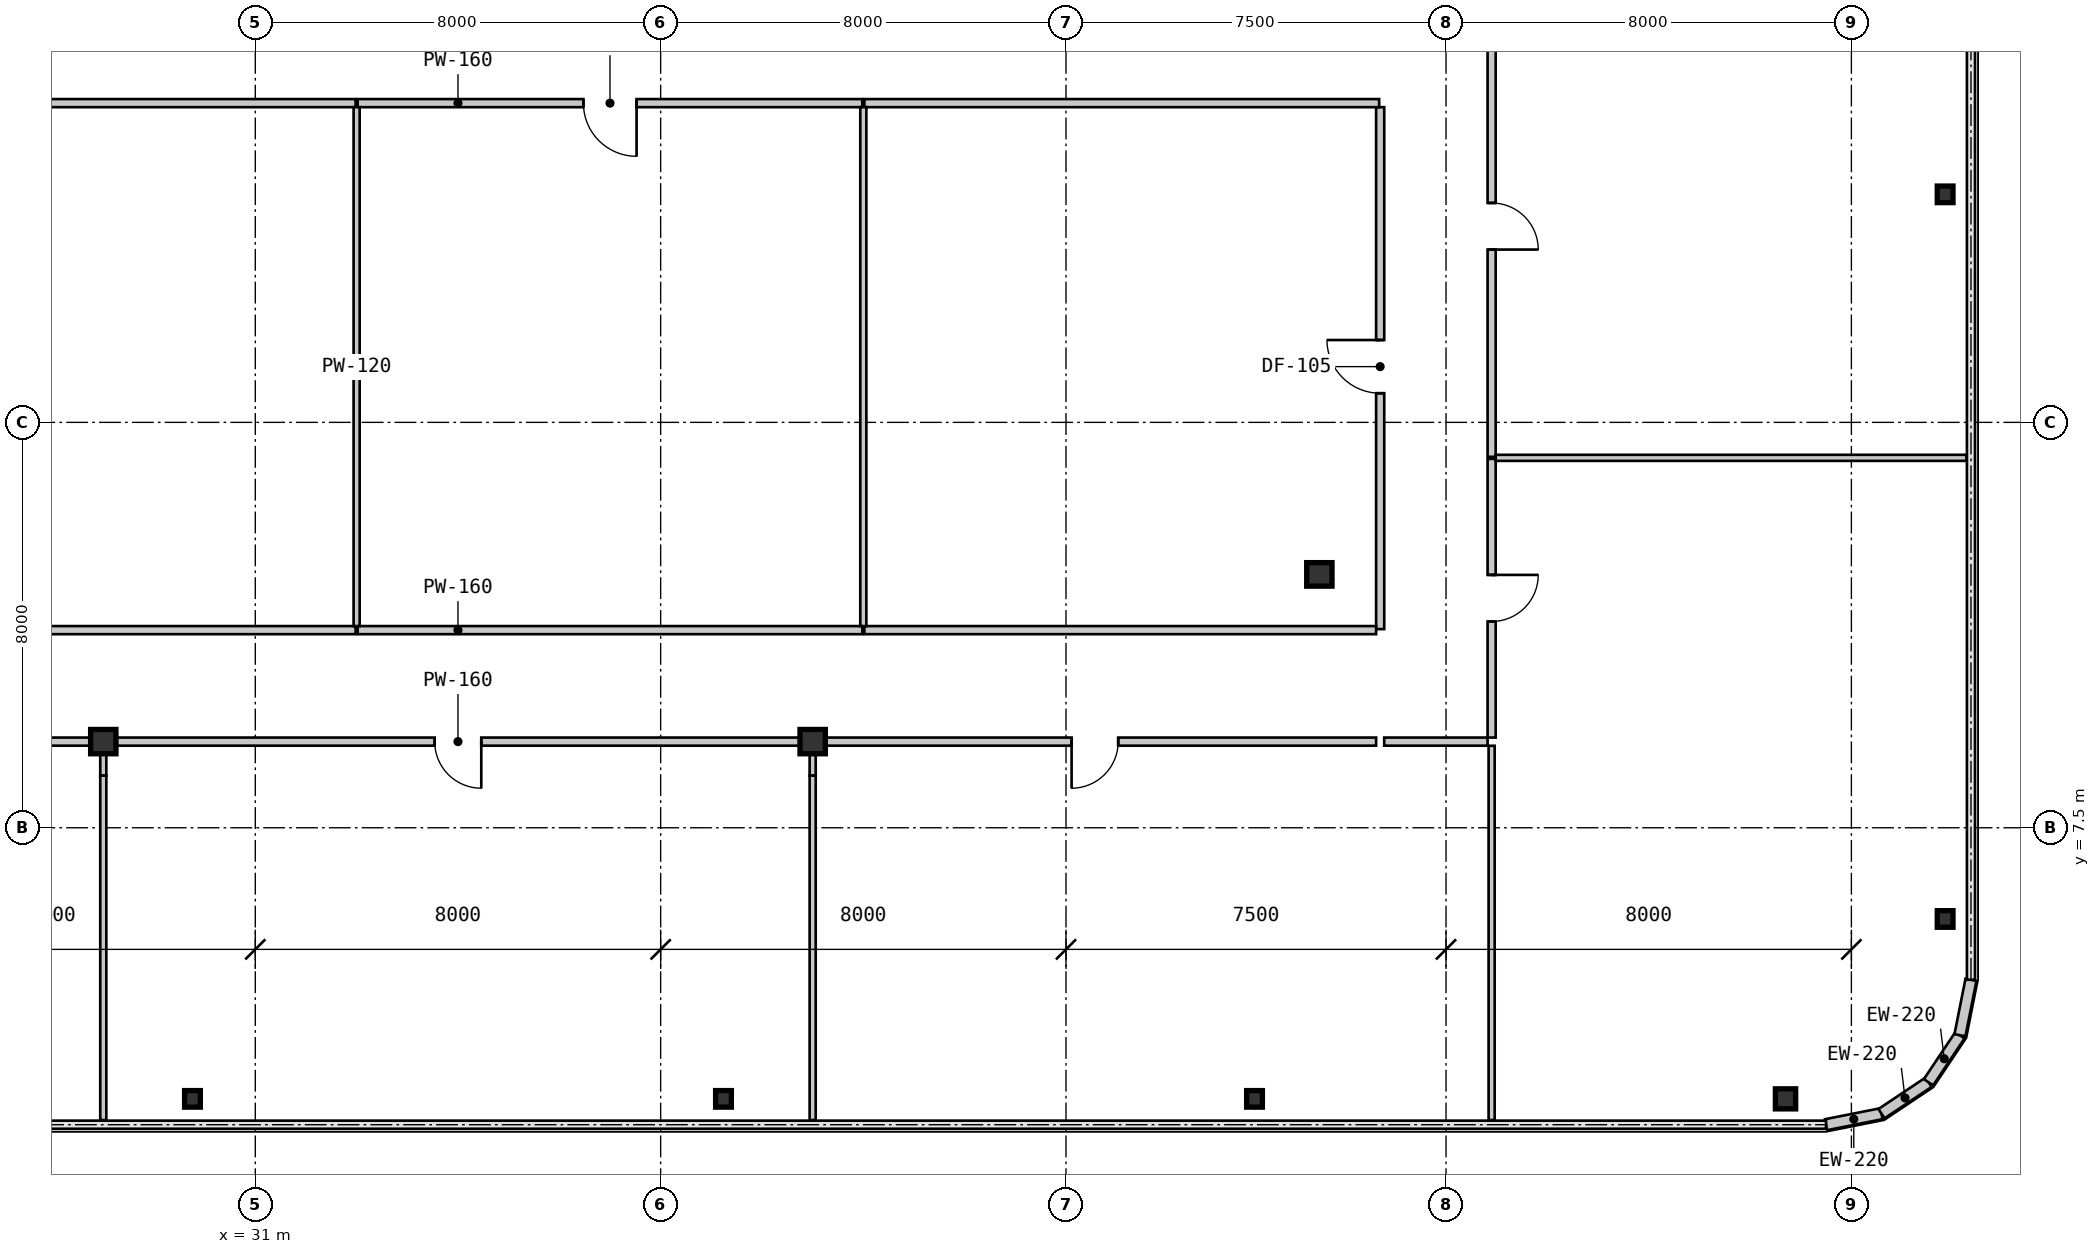
"""IFC4 building model, lengths in metres.
Left out: names, types, materials, properties, quantities, classifications, styles, units other than length and angle.
Written with IfcOpenShell. Run it as: python <this file> out.ifc"""

import sys

from ifc_helpers import new_model, si_unit, direction, frame, frame_2d, origin, origin_2d, place, context, subcontext, project, spatial, rectangle, i_section, extrude, source, transform, mapped, element, fill, save


model = new_model("IFC4")
c1 = context("Model", 3, precision=1e-05, world=origin(), true_north=direction((0.0, 1.0)))
c2 = subcontext(c1, "Body", "Model", "MODEL_VIEW")
j1 = project(units=[si_unit("LENGTHUNIT", "METRE"), si_unit("PLANEANGLEUNIT", "RADIAN")], contexts=[c1])
p1 = place(None, origin())
s1 = spatial("IfcSite", under=j1, at=p1, CompositionType="ELEMENT")
p2 = place(p1, origin())
s2 = spatial("IfcBuilding", under=s1, at=p2, CompositionType="ELEMENT")
p3 = place(p2, frame((0.0, 0.0, 38.85)))
s3 = spatial("IfcBuildingStorey", under=s2, at=p3, CompositionType="ELEMENT", Elevation=38.85)
m1 = source(origin(), c2, "Body", "SweptSolid", [
    extrude(i_section(OverallWidth=0.5, OverallDepth=0.48, WebThickness=0.028, FlangeThickness=0.044, at=origin_2d()), origin(), (0.0, 0.0, 1.0), 3.15),
])
for number, where, z_axis, x_axis in (
    (1, (28.0, 9.2, 0.0), (0.0, 0.0, 1.0), (1.0, 0.0, 0.0)),
    (2, (42.0, 9.2, 0.0), (0.0, 0.0, 1.0), (1.0, 0.0, 0.0)),
):
    element("IfcColumn", number, at=place(p3, frame(where, z_axis=z_axis, x_axis=x_axis)), inside=s3, PredefinedType="COLUMN", context=c2, shape_type="MappedRepresentation", body=[
        mapped(m1, transform((0.0, 0.0, 0.0), scale=1.0)),
    ])
m2 = source(origin(), c2, "Body", "SweptSolid", [
    extrude(i_section(OverallWidth=0.5, OverallDepth=0.464, WebThickness=0.022, FlangeThickness=0.034, at=origin_2d()), origin(), (0.0, 0.0, 1.0), 3.15),
])
p4 = place(p3, frame((52.0, 12.5, 0.0), z_axis=(0.0, 0.0, 1.0), x_axis=(1.0, 0.0, 0.0)))
e3 = element("IfcColumn", 3, at=p4, inside=s3, PredefinedType="COLUMN", context=c2, shape_type="MappedRepresentation", body=[
    mapped(m2, transform((0.0, 0.0, 0.0), scale=1.0)),
])
m3 = source(origin(), c2, "Body", "SweptSolid", [
    extrude(i_section(OverallWidth=0.311, OverallDepth=0.327, WebThickness=0.016, FlangeThickness=0.025, at=origin_2d()), origin(), (0.0, 0.0, 1.0), 3.15),
])
for number, where, z_axis, x_axis in (
    (4, (29.76, 2.15, 0.0), (0.0, 0.0, 1.0), (1.0, 0.0, 0.0)),
    (5, (40.24, 2.15, 0.0), (0.0, 0.0, 1.0), (1.0, 0.0, 0.0)),
    (6, (50.72, 2.15, 0.0), (0.0, 0.0, 1.0), (1.0, 0.0, 0.0)),
):
    element("IfcColumn", number, at=place(p3, frame(where, z_axis=z_axis, x_axis=x_axis)), inside=s3, PredefinedType="COLUMN", context=c2, shape_type="MappedRepresentation", body=[
        mapped(m3, transform((0.0, 0.0, 0.0), scale=1.0)),
    ])
m4 = source(origin(), c2, "Body", "SweptSolid", [
    extrude(i_section(OverallWidth=0.4, OverallDepth=0.396, WebThickness=0.022, FlangeThickness=0.034, at=origin_2d()), origin(), (0.0, 0.0, 1.0), 3.15),
])
p5 = place(p3, frame((61.2, 2.15, 0.0), z_axis=(0.0, 0.0, 1.0), x_axis=(1.0, 0.0, 0.0)))
e7 = element("IfcColumn", 7, at=p5, inside=s3, PredefinedType="COLUMN", context=c2, shape_type="MappedRepresentation", body=[
    mapped(m4, transform((0.0, 0.0, 0.0), scale=1.0)),
])
for number, where, z_axis, x_axis in (
    (8, (64.35, 5.7, 0.0), (0.0, 0.0, 1.0), (1.0, 0.0, 0.0)),
    (9, (64.35, 20.0, 0.0), (0.0, 0.0, 1.0), (1.0, 0.0, 0.0)),
):
    element("IfcColumn", number, at=place(p3, frame(where, z_axis=z_axis, x_axis=x_axis)), inside=s3, PredefinedType="COLUMN", context=c2, shape_type="MappedRepresentation", body=[
        mapped(m3, transform((0.0, 0.0, 0.0), scale=1.0)),
    ])
m5 = source(origin(), c2, "Body", "SweptSolid", [
    extrude(rectangle(XDim=1.116, YDim=0.22, at=frame_2d((0.558, 0.0))), origin(), (0.0, 0.0, 1.0), 2.93),
])
for number, where, z_axis, x_axis in (
    (10, (62.0, 1.64, 0.0), (0.0, 0.0, 1.0), (0.981, 0.195, 0.0)),
    (11, (63.094, 1.858, 0.0), (0.0, 0.0, 1.0), (0.831, 0.556, 0.0)),
    (12, (64.022, 2.478, 0.0), (0.0, 0.0, 1.0), (0.556, 0.831, 0.0)),
    (13, (64.642, 3.406, 0.0), (0.0, 0.0, 1.0), (0.195, 0.981, 0.0)),
):
    element("IfcWall", number, at=place(p3, frame(where, z_axis=z_axis, x_axis=x_axis)), inside=s3, PredefinedType="SOLIDWALL", context=c2, shape_type="MappedRepresentation", body=[
        mapped(m5, transform((0.0, 0.0, 0.0), scale=1.0)),
    ])
m6 = source(origin(), c2, "Body", "SweptSolid", [
    extrude(rectangle(XDim=16.159, YDim=0.16, at=frame_2d((8.08, 0.0))), origin(), (0.0, 0.0, 1.0), 2.93),
])
p6 = place(p3, frame((32.98, 21.8, 0.0), z_axis=(0.0, 0.0, 1.0), x_axis=(-1.0, 0.0, 0.0)))
e14 = element("IfcWall", 14, at=p6, inside=s3, PredefinedType="PARTITIONING", context=c2, shape_type="MappedRepresentation", body=[
    mapped(m6, transform((0.0, 0.0, 0.0), scale=1.0)),
])
m7 = source(origin(), c2, "Body", "SweptSolid", [
    extrude(rectangle(XDim=0.92, YDim=2.1, at=frame_2d((0.46, 1.05))), frame((0.0, 0.09, 0.0), z_axis=(0.0, -1.0, 0.0), x_axis=(1.0, 0.0, 0.0)), (0.0, 0.0, 1.0), 0.18),
])
p7 = place(p6, frame((7.62, 0.0, 0.0)))
e15 = element("IfcOpeningElement", 15, at=p7, cuts=e14, PredefinedType="OPENING", context=c2, shape_type="MappedRepresentation", body=[
    mapped(m7, transform((0.0, 0.0, 0.0), scale=1.0)),
])
m8 = source(origin(), c2, "Body", "SweptSolid", [
    extrude(rectangle(XDim=9.959, YDim=0.16, at=frame_2d((4.98, 0.0))), origin(), (0.0, 0.0, 1.0), 2.93),
])
p8 = place(p3, frame((42.98, 21.8, 0.0), z_axis=(0.0, 0.0, 1.0), x_axis=(-1.0, 0.0, 0.0)))
e16 = element("IfcWall", 16, at=p8, inside=s3, PredefinedType="PARTITIONING", context=c2, shape_type="MappedRepresentation", body=[
    mapped(m8, transform((0.0, 0.0, 0.0), scale=1.0)),
])
m9 = source(origin(), c2, "Body", "SweptSolid", [
    extrude(rectangle(XDim=1.05, YDim=2.1, at=frame_2d((0.525, 1.05))), frame((0.0, 0.09, 0.0), z_axis=(0.0, -1.0, 0.0), x_axis=(1.0, 0.0, 0.0)), (0.0, 0.0, 1.0), 0.18),
])
p9 = place(p8, frame((4.455, 0.0, 0.0)))
e17 = element("IfcOpeningElement", 17, at=p9, cuts=e16, PredefinedType="OPENING", context=c2, shape_type="MappedRepresentation", body=[
    mapped(m9, transform((0.0, 0.0, 0.0), scale=1.0)),
])
m10 = source(origin(), c2, "Body", "SweptSolid", [
    extrude(rectangle(XDim=10.3, YDim=0.16, at=frame_2d((5.15, 0.0))), origin(), (0.0, 0.0, 1.0), 2.93),
])
p10 = place(p3, frame((53.2, 11.42, 0.0), z_axis=(0.0, 0.0, 1.0), x_axis=(0.0, 1.0, 0.0)))
e18 = element("IfcWall", 18, at=p10, inside=s3, PredefinedType="PARTITIONING", context=c2, shape_type="MappedRepresentation", body=[
    mapped(m10, transform((0.0, 0.0, 0.0), scale=1.0)),
])
p11 = place(p10, frame((4.655, 0.0, 0.0)))
e19 = element("IfcOpeningElement", 19, at=p11, cuts=e18, PredefinedType="OPENING", context=c2, shape_type="MappedRepresentation", body=[
    mapped(m9, transform((0.0, 0.0, 0.0), scale=1.0)),
])
m11 = source(origin(), c2, "Body", "SweptSolid", [
    extrude(rectangle(XDim=10.159, YDim=0.16, at=frame_2d((5.08, 0.0))), origin(), (0.0, 0.0, 1.0), 2.93),
])
p12 = place(p3, frame((53.18, 21.8, 0.0), z_axis=(0.0, 0.0, 1.0), x_axis=(-1.0, 0.0, 0.0)))
e20 = element("IfcWall", 20, at=p12, inside=s3, PredefinedType="PARTITIONING", context=c2, shape_type="MappedRepresentation", body=[
    mapped(m11, transform((0.0, 0.0, 0.0), scale=1.0)),
])
m12 = source(origin(), c2, "Body", "SweptSolid", [
    extrude(rectangle(XDim=2.04, YDim=0.16, at=frame_2d((1.02, 0.0))), origin(), (0.0, 0.0, 1.0), 2.93),
])
p13 = place(p3, frame((55.32, 9.2, 0.0), z_axis=(0.0, 0.0, 1.0), x_axis=(-1.0, 0.0, 0.0)))
e21 = element("IfcWall", 21, at=p13, inside=s3, PredefinedType="PARTITIONING", context=c2, shape_type="MappedRepresentation", body=[
    mapped(m12, transform((0.0, 0.0, 0.0), scale=1.0)),
])
m13 = source(origin(), c2, "Body", "SweptSolid", [
    extrude(rectangle(XDim=5.5, YDim=0.16, at=frame_2d((2.75, 0.0))), origin(), (0.0, 0.0, 1.0), 2.93),
])
p14 = place(p3, frame((55.4, 14.78, 0.0), z_axis=(0.0, 0.0, 1.0), x_axis=(0.0, -1.0, 0.0)))
e22 = element("IfcWall", 22, at=p14, inside=s3, PredefinedType="PARTITIONING", context=c2, shape_type="MappedRepresentation", body=[
    mapped(m13, transform((0.0, 0.0, 0.0), scale=1.0)),
])
p15 = place(p14, frame((2.29, 0.0, 0.0)))
e23 = element("IfcOpeningElement", 23, at=p15, cuts=e22, PredefinedType="OPENING", context=c2, shape_type="MappedRepresentation", body=[
    mapped(m7, transform((0.0, 0.0, 0.0), scale=1.0)),
])
m14 = source(origin(), c2, "Body", "SweptSolid", [
    extrude(rectangle(XDim=9.1, YDim=0.16, at=frame_2d((4.55, 0.0))), origin(), (0.0, 0.0, 1.0), 2.93),
])
p16 = place(p3, frame((55.4, 23.92, 0.0), z_axis=(0.0, 0.0, 1.0), x_axis=(0.0, -1.0, 0.0)))
e24 = element("IfcWall", 24, at=p16, inside=s3, PredefinedType="PARTITIONING", context=c2, shape_type="MappedRepresentation", body=[
    mapped(m14, transform((0.0, 0.0, 0.0), scale=1.0)),
])
p17 = place(p16, frame((4.09, 0.0, 0.0)))
e25 = element("IfcOpeningElement", 25, at=p17, cuts=e24, PredefinedType="OPENING", context=c2, shape_type="MappedRepresentation", body=[
    mapped(m7, transform((0.0, 0.0, 0.0), scale=1.0)),
])
m15 = source(origin(), c2, "Body", "SweptSolid", [
    extrude(rectangle(XDim=16.1, YDim=0.16, at=frame_2d((8.05, 0.0))), origin(), (0.0, 0.0, 1.0), 2.93),
])
p18 = place(p3, frame((16.88, 11.4, 0.0), z_axis=(0.0, 0.0, 1.0), x_axis=(1.0, 0.0, 0.0)))
e26 = element("IfcWall", 26, at=p18, inside=s3, PredefinedType="PARTITIONING", context=c2, shape_type="MappedRepresentation", body=[
    mapped(m15, transform((0.0, 0.0, 0.0), scale=1.0)),
])
p19 = place(p3, frame((33.02, 11.4, 0.0), z_axis=(0.0, 0.0, 1.0), x_axis=(1.0, 0.0, 0.0)))
e27 = element("IfcWall", 27, at=p19, inside=s3, PredefinedType="PARTITIONING", context=c2, shape_type="MappedRepresentation", body=[
    mapped(m8, transform((0.0, 0.0, 0.0), scale=1.0)),
])
m16 = source(origin(), c2, "Body", "SweptSolid", [
    extrude(rectangle(XDim=10.1, YDim=0.16, at=frame_2d((5.05, 0.0))), origin(), (0.0, 0.0, 1.0), 2.93),
])
p20 = place(p3, frame((43.02, 11.4, 0.0), z_axis=(0.0, 0.0, 1.0), x_axis=(1.0, 0.0, 0.0)))
e28 = element("IfcWall", 28, at=p20, inside=s3, PredefinedType="PARTITIONING", context=c2, shape_type="MappedRepresentation", body=[
    mapped(m16, transform((0.0, 0.0, 0.0), scale=1.0)),
])
m17 = source(origin(), c2, "Body", "SweptSolid", [
    extrude(rectangle(XDim=11.1, YDim=0.16, at=frame_2d((5.55, 0.0))), origin(), (0.0, 0.0, 1.0), 2.93),
])
p21 = place(p3, frame((27.98, 9.2, 0.0), z_axis=(0.0, 0.0, 1.0), x_axis=(-1.0, 0.0, 0.0)))
e29 = element("IfcWall", 29, at=p21, inside=s3, PredefinedType="PARTITIONING", context=c2, shape_type="MappedRepresentation", body=[
    mapped(m17, transform((0.0, 0.0, 0.0), scale=1.0)),
])
p22 = place(p21, frame((5.09, 0.0, 0.0)))
e30 = element("IfcOpeningElement", 30, at=p22, cuts=e29, PredefinedType="OPENING", context=c2, shape_type="MappedRepresentation", body=[
    mapped(m7, transform((0.0, 0.0, 0.0), scale=1.0)),
])
m18 = source(origin(), c2, "Body", "SweptSolid", [
    extrude(rectangle(XDim=13.959, YDim=0.16, at=frame_2d((6.98, 0.0))), origin(), (0.0, 0.0, 1.0), 2.328),
])
p23 = place(p3, frame((41.98, 9.2, 0.0), z_axis=(0.0, 0.0, 1.0), x_axis=(-1.0, 0.0, 0.0)))
e31 = element("IfcWall", 31, at=p23, inside=s3, PredefinedType="PARTITIONING", context=c2, shape_type="MappedRepresentation", body=[
    mapped(m18, transform((0.0, 0.0, 0.0), scale=1.0)),
])
p24 = place(p23, frame((6.52, 0.0, 0.0)))
e32 = element("IfcOpeningElement", 32, at=p24, cuts=e31, PredefinedType="OPENING", context=c2, shape_type="MappedRepresentation", body=[
    mapped(m7, transform((0.0, 0.0, 0.0), scale=1.0)),
])
p25 = place(p3, frame((53.12, 9.2, 0.0), z_axis=(0.0, 0.0, 1.0), x_axis=(-1.0, 0.0, 0.0)))
e33 = element("IfcWall", 33, at=p25, inside=s3, PredefinedType="PARTITIONING", context=c2, shape_type="MappedRepresentation", body=[
    mapped(m17, transform((0.0, 0.0, 0.0), scale=1.0)),
])
p26 = place(p25, frame((5.09, 0.0, 0.0)))
e34 = element("IfcOpeningElement", 34, at=p26, cuts=e33, PredefinedType="OPENING", context=c2, shape_type="MappedRepresentation", body=[
    mapped(m7, transform((0.0, 0.0, 0.0), scale=1.0)),
])
m19 = source(origin(), c2, "Body", "SweptSolid", [
    extrude(rectangle(XDim=10.24, YDim=0.12, at=frame_2d((5.12, 0.0))), origin(), (0.0, 0.0, 1.0), 2.93),
])
for number, where, z_axis, x_axis in (
    (35, (33.0, 21.72, 0.0), (0.0, 0.0, 1.0), (0.0, -1.0, 0.0)),
    (36, (43.0, 21.72, 0.0), (0.0, 0.0, 1.0), (0.0, -1.0, 0.0)),
):
    element("IfcWall", number, at=place(p3, frame(where, z_axis=z_axis, x_axis=x_axis)), inside=s3, PredefinedType="PARTITIONING", context=c2, shape_type="MappedRepresentation", body=[
        mapped(m19, transform((0.0, 0.0, 0.0), scale=1.0)),
    ])
m20 = source(origin(), c2, "Body", "SweptSolid", [
    extrude(rectangle(XDim=0.59, YDim=0.12, at=frame_2d((0.295, 0.0))), origin(), (0.0, 0.0, 1.0), 2.397),
])
p27 = place(p3, frame((28.0, 9.118, 0.0), z_axis=(0.0, 0.0, 1.0), x_axis=(0.0, -1.0, 0.0)))
e37 = element("IfcWall", 37, at=p27, inside=s3, PredefinedType="PARTITIONING", context=c2, shape_type="MappedRepresentation", body=[
    mapped(m20, transform((0.0, 0.0, 0.0), scale=1.0)),
])
m21 = source(origin(), c2, "Body", "SweptSolid", [
    extrude(rectangle(XDim=6.796, YDim=0.12, at=frame_2d((3.398, 0.0))), origin(), (0.0, 0.0, 1.0), 2.93),
])
p28 = place(p3, frame((28.0, 8.528, 0.0), z_axis=(0.0, 0.0, 1.0), x_axis=(0.0, -1.0, 0.0)))
e38 = element("IfcWall", 38, at=p28, inside=s3, PredefinedType="PARTITIONING", context=c2, shape_type="MappedRepresentation", body=[
    mapped(m21, transform((0.0, 0.0, 0.0), scale=1.0)),
])
p29 = place(p3, frame((42.0, 9.118, 0.0), z_axis=(0.0, 0.0, 1.0), x_axis=(0.0, -1.0, 0.0)))
e39 = element("IfcWall", 39, at=p29, inside=s3, PredefinedType="PARTITIONING", context=c2, shape_type="MappedRepresentation", body=[
    mapped(m20, transform((0.0, 0.0, 0.0), scale=1.0)),
])
p30 = place(p3, frame((42.0, 8.528, 0.0), z_axis=(0.0, 0.0, 1.0), x_axis=(0.0, -1.0, 0.0)))
e40 = element("IfcWall", 40, at=p30, inside=s3, PredefinedType="PARTITIONING", context=c2, shape_type="MappedRepresentation", body=[
    mapped(m21, transform((0.0, 0.0, 0.0), scale=1.0)),
])
m22 = source(origin(), c2, "Body", "SweptSolid", [
    extrude(rectangle(XDim=7.386, YDim=0.12, at=frame_2d((3.693, 0.0))), origin(), (0.0, 0.0, 1.0), 2.93),
])
p31 = place(p3, frame((55.4, 9.118, 0.0), z_axis=(0.0, 0.0, 1.0), x_axis=(0.0, -1.0, 0.0)))
e41 = element("IfcWall", 41, at=p31, inside=s3, PredefinedType="PARTITIONING", context=c2, shape_type="MappedRepresentation", body=[
    mapped(m22, transform((0.0, 0.0, 0.0), scale=1.0)),
])
m23 = source(origin(), c2, "Body", "SweptSolid", [
    extrude(rectangle(XDim=9.29, YDim=0.12, at=frame_2d((4.645, 0.0))), origin(), (0.0, 0.0, 1.0), 2.93),
])
p32 = place(p3, frame((55.48, 14.8, 0.0), z_axis=(0.0, 0.0, 1.0), x_axis=(1.0, 0.0, 0.0)))
e42 = element("IfcWall", 42, at=p32, inside=s3, PredefinedType="PARTITIONING", context=c2, shape_type="MappedRepresentation", body=[
    mapped(m23, transform((0.0, 0.0, 0.0), scale=1.0)),
])
m24 = source(origin(), c2, "Body", "SweptSolid", [
    extrude(rectangle(XDim=1.05, YDim=2.1, at=frame_2d((0.525, 1.05))), frame((0.0, 0.025, 0.0), z_axis=(0.0, -1.0, 0.0), x_axis=(1.0, 0.0, 0.0)), (0.0, 0.0, 1.0), 0.05),
])
p33 = place(p9, origin())
e43 = element("IfcDoor", 43, at=p33, inside=s3, OperationType="SINGLE_SWING_LEFT", PredefinedType="DOOR", context=c2, shape_type="MappedRepresentation", body=[
    mapped(m24, transform((0.0, 0.0, 0.0), scale=1.0)),
])
fill(e17, e43)
p34 = place(p11, origin())
e44 = element("IfcDoor", 44, at=p34, inside=s3, OperationType="SINGLE_SWING_RIGHT", PredefinedType="DOOR", context=c2, shape_type="MappedRepresentation", body=[
    mapped(m24, transform((0.0, 0.0, 0.0), scale=1.0)),
])
fill(e19, e44)
m25 = source(origin(), c2, "Body", "SweptSolid", [
    extrude(rectangle(XDim=0.92, YDim=2.1, at=frame_2d((0.46, 1.05))), frame((0.0, 0.025, 0.0), z_axis=(0.0, -1.0, 0.0), x_axis=(1.0, 0.0, 0.0)), (0.0, 0.0, 1.0), 0.05),
])
p35 = place(p15, origin())
e45 = element("IfcDoor", 45, at=p35, inside=s3, OperationType="SINGLE_SWING_LEFT", PredefinedType="DOOR", context=c2, shape_type="MappedRepresentation", body=[
    mapped(m25, transform((0.0, 0.0, 0.0), scale=1.0)),
])
fill(e23, e45)
p36 = place(p17, origin())
e46 = element("IfcDoor", 46, at=p36, inside=s3, OperationType="SINGLE_SWING_RIGHT", PredefinedType="DOOR", context=c2, shape_type="MappedRepresentation", body=[
    mapped(m25, transform((0.0, 0.0, 0.0), scale=1.0)),
])
fill(e25, e46)
p37 = place(p24, origin())
e47 = element("IfcDoor", 47, at=p37, inside=s3, OperationType="SINGLE_SWING_LEFT", PredefinedType="DOOR", context=c2, shape_type="MappedRepresentation", body=[
    mapped(m25, transform((0.0, 0.0, 0.0), scale=1.0)),
])
fill(e32, e47)
p38 = place(p26, origin())
e48 = element("IfcDoor", 48, at=p38, inside=s3, OperationType="SINGLE_SWING_RIGHT", PredefinedType="DOOR", context=c2, shape_type="MappedRepresentation", body=[
    mapped(m25, transform((0.0, 0.0, 0.0), scale=1.0)),
])
fill(e34, e48)
save(model, sys.argv[1])
